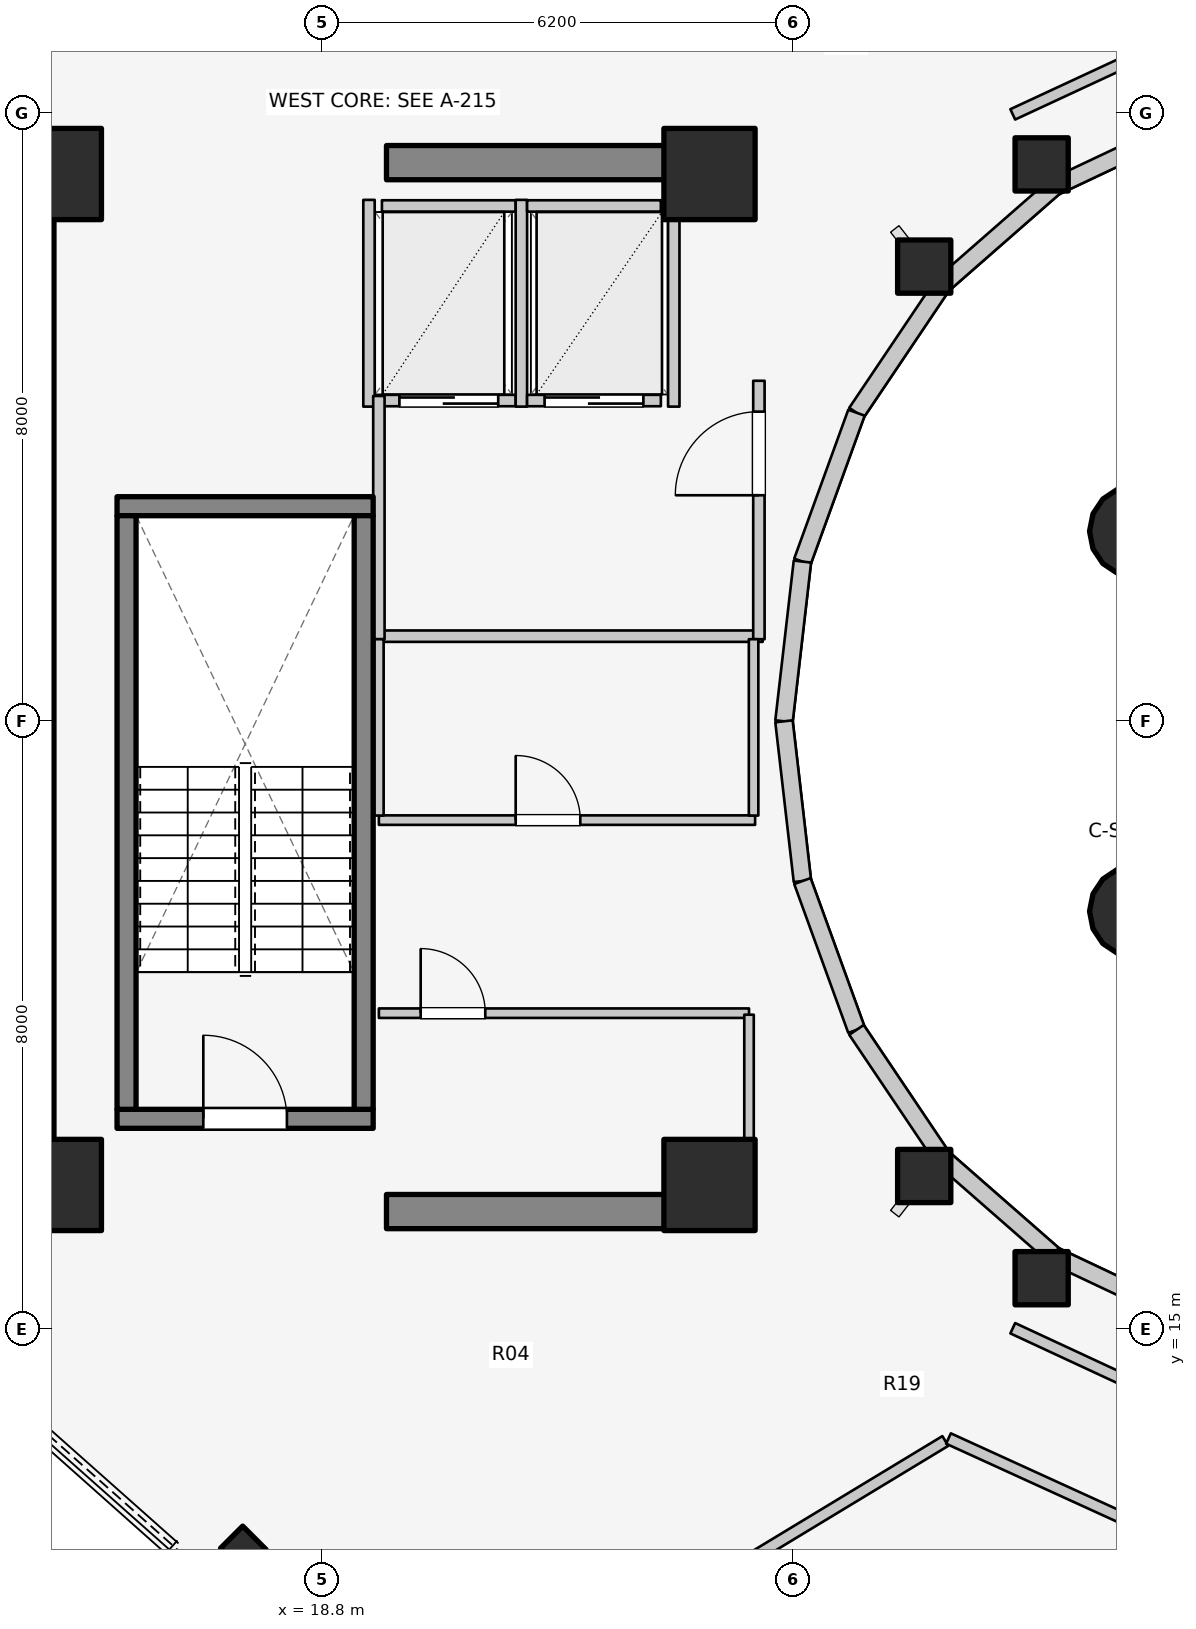
"""IFC4 building model, lengths in metres.
Left out: names, types, materials, properties, quantities, classifications, styles, units other than length and angle.
Written with IfcOpenShell. Run it as: python <this file> out.ifc"""

import sys

from ifc_helpers import new_model, si_unit, direction, frame, frame_2d, origin, origin_2d, place, context, subcontext, project, spatial, rectangle, hollow_circle, i_section, extrude, element, fill, save


model = new_model("IFC4")
c1 = context("Model", 3, precision=1e-05, world=origin(), true_north=direction((0.0, 1.0)))
c2 = subcontext(c1, "Body", "Model", "MODEL_VIEW")
j1 = project(units=[si_unit("LENGTHUNIT", "METRE"), si_unit("PLANEANGLEUNIT", "RADIAN")], contexts=[c1])
p1 = place(None, origin())
s1 = spatial("IfcSite", under=j1, at=p1, CompositionType="ELEMENT")
p2 = place(p1, origin())
s2 = spatial("IfcBuilding", under=s1, at=p2, CompositionType="ELEMENT")
p3 = place(p2, frame((0.0, 0.0, 266.8)))
s3 = spatial("IfcBuildingStorey", under=s2, at=p3, CompositionType="ELEMENT", Elevation=266.8)
p4 = place(p3, frame((15.05, 17.05, 0.0), z_axis=(0.0, 0.0, 1.0), x_axis=(0.0, 1.0, 0.0)))
e1 = element("IfcWall", 1, at=p4, inside=s3, PredefinedType="SHEAR", context=c2, shape_type="SweptSolid", body=[
    extrude(rectangle(XDim=12.8, YDim=0.45, at=frame_2d((6.4, 0.0))), origin(), (0.0, 0.0, 1.0), 3.2),
])
for number, where, z_axis, x_axis in (
    (2, (19.65, 16.55, 0.0), (0.0, 0.0, 1.0), (1.0, 0.0, 0.0)),
    (3, (19.65, 30.35, 0.0), (0.0, 0.0, 1.0), (1.0, 0.0, 0.0)),
):
    element("IfcWall", number, at=place(p3, frame(where, z_axis=z_axis, x_axis=x_axis)), inside=s3, PredefinedType="SHEAR", context=c2, shape_type="SweptSolid", body=[
        extrude(rectangle(XDim=4.5, YDim=0.45, at=frame_2d((2.25, 0.0))), origin(), (0.0, 0.0, 1.0), 3.2),
    ])
p5 = place(p3, frame((16.105, 17.77, 0.0), z_axis=(0.0, 0.0, 1.0), x_axis=(1.0, 0.0, 0.0)))
e4 = element("IfcWall", 4, at=p5, inside=s3, PredefinedType="SOLIDWALL", context=c2, shape_type="SweptSolid", body=[
    extrude(rectangle(XDim=3.37, YDim=0.25, at=frame_2d((1.685, 0.0))), origin(), (0.0, 0.0, 1.0), 3.2),
])
p6 = place(p5, frame((1.135, 0.0, 0.0)))
e5 = element("IfcOpeningElement", 5, at=p6, cuts=e4, PredefinedType="OPENING", context=c2, shape_type="SweptSolid", body=[
    extrude(rectangle(XDim=1.1, YDim=2.1, at=frame_2d((0.55, 1.05))), frame((0.0, 0.135, 0.0), z_axis=(0.0, -1.0, 0.0), x_axis=(1.0, 0.0, 0.0)), (0.0, 0.0, 1.0), 0.27),
])
p7 = place(p3, frame((16.105, 25.83, 0.0), z_axis=(0.0, 0.0, 1.0), x_axis=(1.0, 0.0, 0.0)))
e6 = element("IfcWall", 6, at=p7, inside=s3, PredefinedType="SOLIDWALL", context=c2, shape_type="SweptSolid", body=[
    extrude(rectangle(XDim=3.37, YDim=0.25, at=frame_2d((1.685, 0.0))), origin(), (0.0, 0.0, 1.0), 3.2),
])
for number, where, z_axis, x_axis in (
    (7, (16.23, 17.895, 0.0), (0.0, 0.0, 1.0), (0.0, 1.0, 0.0)),
    (8, (19.35, 17.895, 0.0), (0.0, 0.0, 1.0), (0.0, 1.0, 0.0)),
):
    element("IfcWall", number, at=place(p3, frame(where, z_axis=z_axis, x_axis=x_axis)), inside=s3, PredefinedType="SOLIDWALL", context=c2, shape_type="SweptSolid", body=[
        extrude(rectangle(XDim=7.81, YDim=0.25, at=frame_2d((3.905, 0.0))), origin(), (0.0, 0.0, 1.0), 3.2),
    ])
for number, where, z_axis, x_axis in (
    (9, (15.3, 16.9, 0.0), (0.0, 0.0, 1.0), (1.0, 0.0, 0.0)),
    (10, (23.9, 16.9, 0.0), (0.0, 0.0, 1.0), (1.0, 0.0, 0.0)),
    (11, (23.9, 30.2, 0.0), (0.0, 0.0, 1.0), (1.0, 0.0, 0.0)),
    (12, (15.3, 30.2, 0.0), (0.0, 0.0, 1.0), (1.0, 0.0, 0.0)),
):
    element("IfcColumn", number, at=place(p3, frame(where, z_axis=z_axis, x_axis=x_axis)), inside=s3, PredefinedType="COLUMN", context=c2, shape_type="SweptSolid", body=[
        extrude(rectangle(XDim=1.2, YDim=1.2, at=origin_2d()), origin(), (0.0, 0.0, 1.0), 3.2),
    ])
for number, where, z_axis, x_axis in (
    (13, (28.27, 30.327, 0.0), (0.0, 0.0, 1.0), (1.0, 0.0, 0.0)),
    (14, (26.725, 28.982, 0.0), (0.0, 0.0, 1.0), (1.0, 0.0, 0.0)),
    (15, (26.725, 17.018, 0.0), (0.0, 0.0, 1.0), (1.0, 0.0, 0.0)),
):
    element("IfcColumn", number, at=place(p3, frame(where, z_axis=z_axis, x_axis=x_axis)), inside=s3, PredefinedType="COLUMN", context=c2, shape_type="SweptSolid", body=[
        extrude(rectangle(XDim=0.7, YDim=0.7, at=origin_2d()), origin(), (0.0, 0.0, 1.0), 3.2),
    ])
p8 = place(p3, frame((17.766, 12.113, 0.0), z_axis=(0.0, 0.0, 1.0), x_axis=(-0.707106781187, -0.707106781187, 0.0)))
e16 = element("IfcColumn", 16, at=p8, inside=s3, PredefinedType="COLUMN", context=c2, shape_type="SweptSolid", body=[
    extrude(i_section(OverallWidth=0.412, OverallDepth=0.435, WebThickness=0.036, FlangeThickness=0.057, FilletRadius=0.025, at=origin_2d()), origin(), (0.0, 0.0, 1.0), 3.2),
])
p9 = place(p3, frame((28.27, 15.673, 0.0), z_axis=(0.0, 0.0, 1.0), x_axis=(1.0, 0.0, 0.0)))
e17 = element("IfcColumn", 17, at=p9, inside=s3, PredefinedType="COLUMN", context=c2, shape_type="SweptSolid", body=[
    extrude(rectangle(XDim=0.7, YDim=0.7, at=origin_2d()), origin(), (0.0, 0.0, 1.0), 3.2),
])
for number, where, z_axis, x_axis in (
    (18, (29.5, 20.5, 0.0), (0.0, 0.0, 1.0), (1.0, 0.0, 0.0)),
    (19, (29.5, 25.5, 0.0), (0.0, 0.0, 1.0), (1.0, 0.0, 0.0)),
):
    element("IfcColumn", number, at=place(p3, frame(where, z_axis=z_axis, x_axis=x_axis)), inside=s3, PredefinedType="PILASTER", context=c2, shape_type="SweptSolid", body=[
        extrude(hollow_circle(Radius=0.6, WallThickness=0.032, at=origin_2d()), origin(), (0.0, 0.0, 1.0), 3.2),
    ])
p10 = place(p3, frame((30.157, 30.843, 0.0), z_axis=(0.0, 0.0, 1.0), x_axis=(-0.904179699603, -0.427152280606, 0.0)))
e20 = element("IfcWall", 20, at=p10, inside=s3, PredefinedType="STANDARD", context=c2, shape_type="SweptSolid", body=[
    extrude(rectangle(XDim=1.899, YDim=0.23, at=frame_2d((0.95, 0.0))), origin(), (0.0, 0.0, 1.0), 1.32),
])
p11 = place(p3, frame((28.44, 30.032, 0.0), z_axis=(0.0, 0.0, 1.0), x_axis=(-0.752576694707, -0.658504607869, 0.0)))
e21 = element("IfcWall", 21, at=p11, inside=s3, PredefinedType="STANDARD", context=c2, shape_type="SweptSolid", body=[
    extrude(rectangle(XDim=1.959, YDim=0.23, at=frame_2d((0.98, 0.0))), origin(), (0.0, 0.0, 1.0), 1.32),
])
p12 = place(p3, frame((26.965, 28.742, 0.0), z_axis=(0.0, 0.0, 1.0), x_axis=(-0.558197800898, -0.829707909492, 0.0)))
e22 = element("IfcWall", 22, at=p12, inside=s3, PredefinedType="STANDARD", context=c2, shape_type="SweptSolid", body=[
    extrude(rectangle(XDim=2.027, YDim=0.23, at=frame_2d((1.013, 0.0))), origin(), (0.0, 0.0, 1.0), 1.32),
])
p13 = place(p3, frame((25.834, 27.06, 0.0), z_axis=(0.0, 0.0, 1.0), x_axis=(-0.341423187295, -0.93990968033, 0.0)))
e23 = element("IfcWall", 23, at=p13, inside=s3, PredefinedType="STANDARD", context=c2, shape_type="SweptSolid", body=[
    extrude(rectangle(XDim=2.084, YDim=0.23, at=frame_2d((1.042, 0.0))), origin(), (0.0, 0.0, 1.0), 2.9),
])
for number, where, z_axis, x_axis in (
    (24, (25.123, 25.102, 0.0), (0.0, 0.0, 1.0), (-0.115, -0.993, 0.0)),
    (25, (24.88, 23.0, 0.0), (0.0, 0.0, 1.0), (0.115, -0.993, 0.0)),
):
    element("IfcWall", number, at=place(p3, frame(where, z_axis=z_axis, x_axis=x_axis)), inside=s3, PredefinedType="STANDARD", context=c2, shape_type="SweptSolid", body=[
        extrude(rectangle(XDim=2.115, YDim=0.23, at=frame_2d((1.058, 0.0))), origin(), (0.0, 0.0, 1.0), 2.9),
    ])
p14 = place(p3, frame((25.123, 20.898, 0.0), z_axis=(0.0, 0.0, 1.0), x_axis=(0.341423187295, -0.93990968033, 0.0)))
e26 = element("IfcWall", 26, at=p14, inside=s3, PredefinedType="STANDARD", context=c2, shape_type="SweptSolid", body=[
    extrude(rectangle(XDim=2.084, YDim=0.23, at=frame_2d((1.042, 0.0))), origin(), (0.0, 0.0, 1.0), 2.9),
])
p15 = place(p3, frame((25.834, 18.94, 0.0), z_axis=(0.0, 0.0, 1.0), x_axis=(0.558197800898, -0.829707909492, 0.0)))
e27 = element("IfcWall", 27, at=p15, inside=s3, PredefinedType="STANDARD", context=c2, shape_type="SweptSolid", body=[
    extrude(rectangle(XDim=2.027, YDim=0.23, at=frame_2d((1.013, 0.0))), origin(), (0.0, 0.0, 1.0), 1.32),
])
p16 = place(p3, frame((26.965, 17.258, 0.0), z_axis=(0.0, 0.0, 1.0), x_axis=(0.752576694707, -0.658504607869, 0.0)))
e28 = element("IfcWall", 28, at=p16, inside=s3, PredefinedType="STANDARD", context=c2, shape_type="SweptSolid", body=[
    extrude(rectangle(XDim=1.959, YDim=0.23, at=frame_2d((0.98, 0.0))), origin(), (0.0, 0.0, 1.0), 1.32),
])
p17 = place(p3, frame((28.44, 15.968, 0.0), z_axis=(0.0, 0.0, 1.0), x_axis=(0.904179699603, -0.427152280606, 0.0)))
e29 = element("IfcWall", 29, at=p17, inside=s3, PredefinedType="STANDARD", context=c2, shape_type="SweptSolid", body=[
    extrude(rectangle(XDim=1.899, YDim=0.23, at=frame_2d((0.95, 0.0))), origin(), (0.0, 0.0, 1.0), 1.32),
])
p18 = place(p3, frame((17.353, 34.3, 0.0), z_axis=(0.0, 0.0, 1.0), x_axis=(-0.747666410784, -0.664074497467, 0.0)))
e30 = element("IfcWall", 30, at=p18, inside=s3, PredefinedType="STANDARD", context=c2, shape_type="SweptSolid", body=[
    extrude(rectangle(XDim=4.033, YDim=0.26, at=frame_2d((2.017, 0.0))), origin(), (0.0, 0.0, 1.0), 1.32),
])
p19 = place(p3, frame((19.59, 27.22, 0.0), z_axis=(0.0, 0.0, 1.0), x_axis=(1.0, 0.0, 0.0)))
e31 = element("IfcWall", 31, at=p19, inside=s3, PredefinedType="SOLIDWALL", context=c2, shape_type="SweptSolid", body=[
    extrude(rectangle(XDim=1.76, YDim=0.15, at=frame_2d((0.88, 0.0))), origin(), (0.0, 0.0, 1.0), 2.915),
])
p20 = place(p19, frame((0.23, 0.0, 0.0)))
e32 = element("IfcOpeningElement", 32, at=p20, cuts=e31, PredefinedType="OPENING", context=c2, shape_type="SweptSolid", body=[
    extrude(rectangle(XDim=1.3, YDim=2.1, at=frame_2d((0.65, 1.05))), frame((0.0, 0.085, 0.0), z_axis=(0.0, -1.0, 0.0), x_axis=(1.0, 0.0, 0.0)), (0.0, 0.0, 1.0), 0.17),
])
p21 = place(p3, frame((19.59, 29.78, 0.0), z_axis=(0.0, 0.0, 1.0), x_axis=(1.0, 0.0, 0.0)))
e33 = element("IfcWall", 33, at=p21, inside=s3, PredefinedType="SOLIDWALL", context=c2, shape_type="SweptSolid", body=[
    extrude(rectangle(XDim=1.76, YDim=0.15, at=frame_2d((0.88, 0.0))), origin(), (0.0, 0.0, 1.0), 2.915),
])
for number, where, z_axis, x_axis in (
    (34, (19.42, 27.14, 0.0), (0.0, 0.0, 1.0), (0.0, 1.0, 0.0)),
    (35, (21.425, 27.14, 0.0), (0.0, 0.0, 1.0), (0.0, 1.0, 0.0)),
):
    element("IfcWall", number, at=place(p3, frame(where, z_axis=z_axis, x_axis=x_axis)), inside=s3, PredefinedType="SOLIDWALL", context=c2, shape_type="SweptSolid", body=[
        extrude(rectangle(XDim=2.72, YDim=0.15, at=frame_2d((1.36, 0.0))), origin(), (0.0, 0.0, 1.0), 2.915),
    ])
p22 = place(p3, frame((21.5, 27.22, 0.0), z_axis=(0.0, 0.0, 1.0), x_axis=(1.0, 0.0, 0.0)))
e36 = element("IfcWall", 36, at=p22, inside=s3, PredefinedType="SOLIDWALL", context=c2, shape_type="SweptSolid", body=[
    extrude(rectangle(XDim=1.76, YDim=0.15, at=frame_2d((0.88, 0.0))), origin(), (0.0, 0.0, 1.0), 2.915),
])
p23 = place(p22, frame((0.23, 0.0, 0.0)))
e37 = element("IfcOpeningElement", 37, at=p23, cuts=e36, PredefinedType="OPENING", context=c2, shape_type="SweptSolid", body=[
    extrude(rectangle(XDim=1.3, YDim=2.1, at=frame_2d((0.65, 1.05))), frame((0.0, 0.085, 0.0), z_axis=(0.0, -1.0, 0.0), x_axis=(1.0, 0.0, 0.0)), (0.0, 0.0, 1.0), 0.17),
])
p24 = place(p3, frame((21.5, 29.78, 0.0), z_axis=(0.0, 0.0, 1.0), x_axis=(1.0, 0.0, 0.0)))
e38 = element("IfcWall", 38, at=p24, inside=s3, PredefinedType="SOLIDWALL", context=c2, shape_type="SweptSolid", body=[
    extrude(rectangle(XDim=1.76, YDim=0.15, at=frame_2d((0.88, 0.0))), origin(), (0.0, 0.0, 1.0), 2.915),
])
p25 = place(p3, frame((23.43, 27.14, 0.0), z_axis=(0.0, 0.0, 1.0), x_axis=(0.0, 1.0, 0.0)))
e39 = element("IfcWall", 39, at=p25, inside=s3, PredefinedType="SOLIDWALL", context=c2, shape_type="SweptSolid", body=[
    extrude(rectangle(XDim=2.72, YDim=0.15, at=frame_2d((1.36, 0.0))), origin(), (0.0, 0.0, 1.0), 2.915),
])
p26 = place(p3, frame((19.52, 24.12, 0.0), z_axis=(0.0, 0.0, 1.0), x_axis=(1.0, 0.0, 0.0)))
e40 = element("IfcWall", 40, at=p26, inside=s3, PredefinedType="PARTITIONING", context=c2, shape_type="SweptSolid", body=[
    extrude(rectangle(XDim=5.08, YDim=0.15, at=frame_2d((2.54, 0.0))), origin(), (0.0, 0.0, 1.0), 2.22),
])
p27 = place(p3, frame((19.55, 24.08, 0.0), z_axis=(0.0, 0.0, 1.0), x_axis=(0.0, 1.0, 0.0)))
e41 = element("IfcWall", 41, at=p27, inside=s3, PredefinedType="PARTITIONING", context=c2, shape_type="SweptSolid", body=[
    extrude(rectangle(XDim=3.2, YDim=0.15, at=frame_2d((1.6, 0.0))), origin(), (0.0, 0.0, 1.0), 2.915),
])
p28 = place(p3, frame((24.55, 24.08, 0.0), z_axis=(0.0, 0.0, 1.0), x_axis=(0.0, 1.0, 0.0)))
e42 = element("IfcWall", 42, at=p28, inside=s3, PredefinedType="PARTITIONING", context=c2, shape_type="SweptSolid", body=[
    extrude(rectangle(XDim=3.4, YDim=0.15, at=frame_2d((1.7, 0.0))), origin(), (0.0, 0.0, 1.0), 2.915),
])
p29 = place(p28, frame((1.894, 0.0, 0.0)))
e43 = element("IfcOpeningElement", 43, at=p29, cuts=e42, PredefinedType="OPENING", context=c2, shape_type="SweptSolid", body=[
    extrude(rectangle(XDim=1.1, YDim=2.1, at=frame_2d((0.55, 1.05))), frame((0.0, 0.085, 0.0), z_axis=(0.0, -1.0, 0.0), x_axis=(1.0, 0.0, 0.0)), (0.0, 0.0, 1.0), 0.17),
])
p30 = place(p3, frame((19.55, 19.16, 0.0), z_axis=(0.0, 0.0, 1.0), x_axis=(1.0, 0.0, 0.0)))
e44 = element("IfcWall", 44, at=p30, inside=s3, PredefinedType="PARTITIONING", context=c2, shape_type="SweptSolid", body=[
    extrude(rectangle(XDim=4.87, YDim=0.125, at=frame_2d((2.435, 0.0))), origin(), (0.0, 0.0, 1.0), 2.22),
])
p31 = place(p30, frame((0.55, 0.0, 0.0)))
e45 = element("IfcOpeningElement", 45, at=p31, cuts=e44, PredefinedType="OPENING", context=c2, shape_type="SweptSolid", body=[
    extrude(rectangle(XDim=0.85, YDim=2.05, at=frame_2d((0.425, 1.025))), frame((0.0, 0.073, 0.0), z_axis=(0.0, -1.0, 0.0), x_axis=(1.0, 0.0, 0.0)), (0.0, 0.0, 1.0), 0.145),
])
p32 = place(p3, frame((24.42, 17.1, 0.0), z_axis=(0.0, 0.0, 1.0), x_axis=(0.0, 1.0, 0.0)))
e46 = element("IfcWall", 46, at=p32, inside=s3, PredefinedType="PARTITIONING", context=c2, shape_type="SweptSolid", body=[
    extrude(rectangle(XDim=2.04, YDim=0.125, at=frame_2d((1.02, 0.0))), origin(), (0.0, 0.0, 1.0), 2.491),
])
p33 = place(p3, frame((19.55, 21.7, 0.0), z_axis=(0.0, 0.0, 1.0), x_axis=(1.0, 0.0, 0.0)))
e47 = element("IfcWall", 47, at=p33, inside=s3, PredefinedType="PARTITIONING", context=c2, shape_type="SweptSolid", body=[
    extrude(rectangle(XDim=4.95, YDim=0.125, at=frame_2d((2.475, 0.0))), origin(), (0.0, 0.0, 1.0), 2.22),
])
p34 = place(p33, frame((1.8, 0.0, 0.0)))
e48 = element("IfcOpeningElement", 48, at=p34, cuts=e47, PredefinedType="OPENING", context=c2, shape_type="SweptSolid", body=[
    extrude(rectangle(XDim=0.85, YDim=2.05, at=frame_2d((0.425, 1.025))), frame((0.0, 0.073, 0.0), z_axis=(0.0, -1.0, 0.0), x_axis=(1.0, 0.0, 0.0)), (0.0, 0.0, 1.0), 0.145),
])
for number, where, z_axis, x_axis in (
    (49, (19.55, 21.76, 0.0), (0.0, 0.0, 1.0), (0.0, 1.0, 0.0)),
    (50, (24.48, 21.76, 0.0), (0.0, 0.0, 1.0), (0.0, 1.0, 0.0)),
):
    element("IfcWall", number, at=place(p3, frame(where, z_axis=z_axis, x_axis=x_axis)), inside=s3, PredefinedType="PARTITIONING", context=c2, shape_type="SweptSolid", body=[
        extrude(rectangle(XDim=2.32, YDim=0.125, at=frame_2d((1.16, 0.0))), origin(), (0.0, 0.0, 1.0), 2.915),
    ])
for number, where, z_axis, x_axis in (
    (51, (29.873, 31.906, 0.0), (0.0, 0.0, 1.0), (-0.907, -0.421, 0.0)),
    (52, (27.89, 15.015, 0.0), (0.0, 0.0, 1.0), (0.907, -0.421, 0.0)),
):
    element("IfcWall", number, at=place(p3, frame(where, z_axis=z_axis, x_axis=x_axis)), inside=s3, PredefinedType="PARTITIONING", context=c2, shape_type="SweptSolid", body=[
        extrude(rectangle(XDim=2.186, YDim=0.15, at=frame_2d((1.093, 0.0))), origin(), (0.0, 0.0, 1.0), 1.32),
    ])
p35 = place(p3, frame((27.003, 13.532, 0.0), z_axis=(0.0, 0.0, 1.0), x_axis=(-0.855519935897, -0.517769870969, 0.0)))
e53 = element("IfcWall", 53, at=p35, inside=s3, PredefinedType="PARTITIONING", context=c2, shape_type="SweptSolid", body=[
    extrude(rectangle(XDim=6.736, YDim=0.15, at=frame_2d((3.368, 0.0))), origin(), (0.0, 0.0, 1.0), 1.32),
])
p36 = place(p3, frame((27.044, 13.564, 0.0), z_axis=(0.0, 0.0, 1.0), x_axis=(0.909736731002, -0.415185597373, 0.0)))
e54 = element("IfcWall", 54, at=p36, inside=s3, PredefinedType="PARTITIONING", context=c2, shape_type="SweptSolid", body=[
    extrude(rectangle(XDim=2.633, YDim=0.15, at=frame_2d((1.317, 0.0))), origin(), (0.0, 0.0, 1.0), 1.32),
])
p37 = place(p6, origin())
e55 = element("IfcDoor", 55, at=p37, inside=s3, OperationType="SINGLE_SWING_LEFT", PredefinedType="DOOR", context=c2, shape_type="SweptSolid", body=[
    extrude(rectangle(XDim=1.1, YDim=2.1, at=frame_2d((0.55, 1.05))), frame((0.0, 0.025, 0.0), z_axis=(0.0, -1.0, 0.0), x_axis=(1.0, 0.0, 0.0)), (0.0, 0.0, 1.0), 0.05),
])
fill(e5, e55)
p38 = place(p20, origin())
e56 = element("IfcDoor", 56, at=p38, inside=s3, OperationType="DOUBLE_DOOR_SLIDING", PredefinedType="DOOR", context=c2, shape_type="SweptSolid", body=[
    extrude(rectangle(XDim=1.3, YDim=2.1, at=frame_2d((0.65, 1.05))), frame((0.0, 0.025, 0.0), z_axis=(0.0, -1.0, 0.0), x_axis=(1.0, 0.0, 0.0)), (0.0, 0.0, 1.0), 0.05),
])
fill(e32, e56)
p39 = place(p23, origin())
e57 = element("IfcDoor", 57, at=p39, inside=s3, OperationType="DOUBLE_DOOR_SLIDING", PredefinedType="DOOR", context=c2, shape_type="SweptSolid", body=[
    extrude(rectangle(XDim=1.3, YDim=2.1, at=frame_2d((0.65, 1.05))), frame((0.0, 0.025, 0.0), z_axis=(0.0, -1.0, 0.0), x_axis=(1.0, 0.0, 0.0)), (0.0, 0.0, 1.0), 0.05),
])
fill(e37, e57)
p40 = place(p29, origin())
e58 = element("IfcDoor", 58, at=p40, inside=s3, OperationType="SINGLE_SWING_LEFT", PredefinedType="DOOR", context=c2, shape_type="SweptSolid", body=[
    extrude(rectangle(XDim=1.1, YDim=2.1, at=frame_2d((0.55, 1.05))), frame((0.0, 0.025, 0.0), z_axis=(0.0, -1.0, 0.0), x_axis=(1.0, 0.0, 0.0)), (0.0, 0.0, 1.0), 0.05),
])
fill(e43, e58)
p41 = place(p31, origin())
e59 = element("IfcDoor", 59, at=p41, inside=s3, OperationType="SINGLE_SWING_LEFT", PredefinedType="DOOR", context=c2, shape_type="SweptSolid", body=[
    extrude(rectangle(XDim=0.85, YDim=2.05, at=frame_2d((0.425, 1.025))), frame((0.0, 0.025, 0.0), z_axis=(0.0, -1.0, 0.0), x_axis=(1.0, 0.0, 0.0)), (0.0, 0.0, 1.0), 0.05),
])
fill(e45, e59)
p42 = place(p34, origin())
e60 = element("IfcDoor", 60, at=p42, inside=s3, OperationType="SINGLE_SWING_LEFT", PredefinedType="DOOR", context=c2, shape_type="SweptSolid", body=[
    extrude(rectangle(XDim=0.85, YDim=2.05, at=frame_2d((0.425, 1.025))), frame((0.0, 0.025, 0.0), z_axis=(0.0, -1.0, 0.0), x_axis=(1.0, 0.0, 0.0)), (0.0, 0.0, 1.0), 0.05),
])
fill(e48, e60)
save(model, sys.argv[1])
